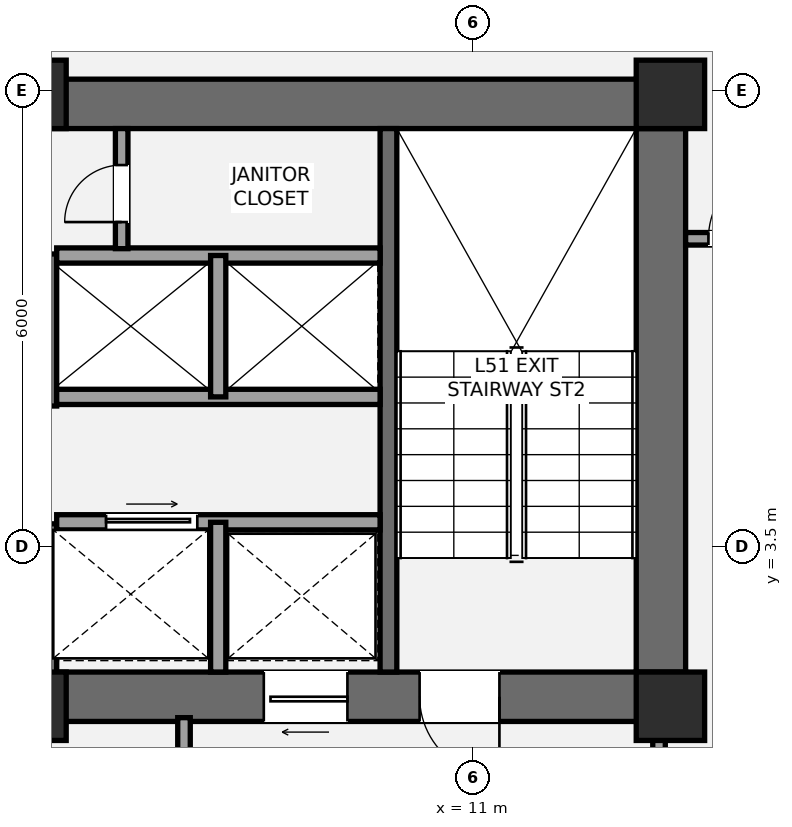
"""IFC4 building model, lengths in metres.
Left out: names, types, materials, properties, quantities, classifications, styles, units other than length and angle.
Written with IfcOpenShell. Run it as: python <this file> out.ifc"""

import sys

from ifc_helpers import new_model, si_unit, direction, frame, frame_2d, origin, origin_2d, place, context, subcontext, project, spatial, rectangle, extrude, element, fill, save


model = new_model("IFC4")
c1 = context("Model", 3, precision=1e-05, world=origin(), true_north=direction((0.0, 1.0)))
c2 = subcontext(c1, "Body", "Model", "MODEL_VIEW")
j1 = project(units=[si_unit("LENGTHUNIT", "METRE"), si_unit("PLANEANGLEUNIT", "RADIAN")], contexts=[c1])
p1 = place(None, origin())
s1 = spatial("IfcSite", under=j1, at=p1, CompositionType="ELEMENT")
p2 = place(p1, origin())
s2 = spatial("IfcBuilding", under=s1, at=p2, CompositionType="ELEMENT")
p3 = place(p2, frame((0.0, 0.0, 185.4)))
s3 = spatial("IfcBuildingStorey", under=s2, at=p3, CompositionType="ELEMENT", Elevation=185.4)
p4 = place(p3, frame((13.475, 1.2, 0.0), z_axis=(0.0, 0.0, 1.0), x_axis=(0.0, 1.0, 0.0)))
e1 = element("IfcWall", 1, at=p4, inside=s3, PredefinedType="SHEAR", context=c2, shape_type="SweptSolid", body=[
    extrude(rectangle(XDim=8.45, YDim=0.65, at=frame_2d((4.225, 0.0))), origin(), (0.0, 0.0, 1.0), 3.2),
])
p5 = place(p3, frame((4.475, 9.325, 0.0), z_axis=(0.0, 0.0, 1.0), x_axis=(1.0, 0.0, 0.0)))
e2 = element("IfcWall", 2, at=p5, inside=s3, PredefinedType="SHEAR", context=c2, shape_type="SweptSolid", body=[
    extrude(rectangle(XDim=9.325, YDim=0.65, at=frame_2d((4.663, 0.0))), origin(), (0.0, 0.0, 1.0), 3.2),
])
p6 = place(p3, frame((13.8, 1.525, 0.0), z_axis=(0.0, 0.0, 1.0), x_axis=(-1.0, 0.0, 0.0)))
e3 = element("IfcWall", 3, at=p6, inside=s3, PredefinedType="SHEAR", context=c2, shape_type="SweptSolid", body=[
    extrude(rectangle(XDim=8.925, YDim=0.65, at=frame_2d((4.462, 0.0))), origin(), (0.0, 0.0, 1.0), 3.2),
])
p7 = place(p6, frame((2.45, 0.0, 0.0)))
e4 = element("IfcOpeningElement", 4, at=p7, cuts=e3, PredefinedType="OPENING", context=c2, shape_type="SweptSolid", body=[
    extrude(rectangle(XDim=1.05, YDim=2.15, at=frame_2d((0.525, 1.075))), frame((0.0, 0.335, 0.0), z_axis=(0.0, -1.0, 0.0), x_axis=(1.0, 0.0, 0.0)), (0.0, 0.0, 1.0), 0.67),
])
p8 = place(p6, frame((4.45, 0.0, 0.0)))
e5 = element("IfcOpeningElement", 5, at=p8, cuts=e3, PredefinedType="OPENING", context=c2, shape_type="SweptSolid", body=[
    extrude(rectangle(XDim=1.1, YDim=2.2, at=frame_2d((0.55, 1.1))), frame((0.0, 0.335, 0.0), z_axis=(0.0, -1.0, 0.0), x_axis=(1.0, 0.0, 0.0)), (0.0, 0.0, 1.0), 0.67),
])
p9 = place(p3, frame((5.2, 1.2, 0.0), z_axis=(0.0, 0.0, 1.0), x_axis=(0.0, 1.0, 0.0)))
e6 = element("IfcWall", 6, at=p9, inside=s3, PredefinedType="SHEAR", context=c2, shape_type="SweptSolid", body=[
    extrude(rectangle(XDim=2.6, YDim=0.65, at=frame_2d((1.3, 0.0))), origin(), (0.0, 0.0, 1.0), 3.2),
])
p10 = place(p3, frame((5.2, 5.35, 0.0), z_axis=(0.0, 0.0, 1.0), x_axis=(0.0, 1.0, 0.0)))
e7 = element("IfcWall", 7, at=p10, inside=s3, PredefinedType="SHEAR", context=c2, shape_type="SweptSolid", body=[
    extrude(rectangle(XDim=2.0, YDim=0.65, at=frame_2d((1.0, 0.0))), origin(), (0.0, 0.0, 1.0), 3.2),
])
p11 = place(p3, frame((9.89, 1.85, 0.0), z_axis=(0.0, 0.0, 1.0), x_axis=(0.0, 1.0, 0.0)))
e8 = element("IfcWall", 8, at=p11, inside=s3, PredefinedType="SHEAR", context=c2, shape_type="SweptSolid", body=[
    extrude(rectangle(XDim=7.15, YDim=0.22, at=frame_2d((3.575, 0.0))), origin(), (0.0, 0.0, 1.0), 3.2),
])
for number, where, z_axis, x_axis in (
    (9, (5.2, 1.4, 0.0), (0.0, 0.0, 1.0), (1.0, 0.0, 0.0)),
    (10, (5.2, 9.45, 0.0), (0.0, 0.0, 1.0), (1.0, 0.0, 0.0)),
    (11, (13.6, 1.4, 0.0), (0.0, 0.0, 1.0), (1.0, 0.0, 0.0)),
    (12, (13.6, 9.45, 0.0), (0.0, 0.0, 1.0), (1.0, 0.0, 0.0)),
):
    element("IfcColumn", number, at=place(p3, frame(where, z_axis=z_axis, x_axis=x_axis)), inside=s3, PredefinedType="COLUMN", context=c2, shape_type="SweptSolid", body=[
        extrude(rectangle(XDim=0.9, YDim=0.9, at=origin_2d()), origin(), (0.0, 0.0, 1.0), 3.2),
    ])
p12 = place(p3, frame((7.2, -2.15, 0.0), z_axis=(0.0, 0.0, 1.0), x_axis=(0.0, 1.0, 0.0)))
e13 = element("IfcWall", 13, at=p12, inside=s3, PredefinedType="PARTITIONING", context=c2, shape_type="SweptSolid", body=[
    extrude(rectangle(XDim=3.4, YDim=0.165, at=frame_2d((1.7, 0.0))), origin(), (0.0, 0.0, 1.0), 2.473),
])
p13 = place(p3, frame((13.45, -2.15, 0.0), z_axis=(0.0, 0.0, 1.0), x_axis=(0.0, 1.0, 0.0)))
e14 = element("IfcWall", 14, at=p13, inside=s3, PredefinedType="PARTITIONING", context=c2, shape_type="SweptSolid", body=[
    extrude(rectangle(XDim=3.4, YDim=0.165, at=frame_2d((1.7, 0.0))), origin(), (0.0, 0.0, 1.0), 2.473),
])
p14 = place(p13, frame((1.15, 0.0, 0.0)))
e15 = element("IfcOpeningElement", 15, at=p14, cuts=e14, PredefinedType="OPENING", context=c2, shape_type="SweptSolid", body=[
    extrude(rectangle(XDim=1.05, YDim=2.15, at=frame_2d((0.525, 1.075))), frame((0.0, 0.093, 0.0), z_axis=(0.0, -1.0, 0.0), x_axis=(1.0, 0.0, 0.0)), (0.0, 0.0, 1.0), 0.185),
])
p15 = place(p3, frame((5.525, 3.82, 0.0), z_axis=(0.0, 0.0, 1.0), x_axis=(1.0, 0.0, 0.0)))
e16 = element("IfcWall", 16, at=p15, inside=s3, PredefinedType="SOLIDWALL", context=c2, shape_type="SweptSolid", body=[
    extrude(rectangle(XDim=4.255, YDim=0.2, at=frame_2d((2.127, 0.0))), origin(), (0.0, 0.0, 1.0), 3.02),
])
p16 = place(p15, frame((0.65, 0.0, 0.0)))
e17 = element("IfcOpeningElement", 17, at=p16, cuts=e16, PredefinedType="OPENING", context=c2, shape_type="SweptSolid", body=[
    extrude(rectangle(XDim=1.2, YDim=2.2, at=frame_2d((0.6, 1.1))), frame((0.0, 0.11, 0.0), z_axis=(0.0, -1.0, 0.0), x_axis=(1.0, 0.0, 0.0)), (0.0, 0.0, 1.0), 0.22),
])
p17 = place(p3, frame((7.65, 1.85, 0.0), z_axis=(0.0, 0.0, 1.0), x_axis=(0.0, 1.0, 0.0)))
e18 = element("IfcWall", 18, at=p17, inside=s3, PredefinedType="SOLIDWALL", context=c2, shape_type="SweptSolid", body=[
    extrude(rectangle(XDim=1.97, YDim=0.2, at=frame_2d((0.985, 0.0))), origin(), (0.0, 0.0, 1.0), 3.02),
])
for number, where, z_axis, x_axis in (
    (19, (5.525, 5.47, 0.0), (0.0, 0.0, 1.0), (1.0, 0.0, 0.0)),
    (20, (5.525, 7.33, 0.0), (0.0, 0.0, 1.0), (1.0, 0.0, 0.0)),
):
    element("IfcWall", number, at=place(p3, frame(where, z_axis=z_axis, x_axis=x_axis)), inside=s3, PredefinedType="SOLIDWALL", context=c2, shape_type="SweptSolid", body=[
        extrude(rectangle(XDim=4.255, YDim=0.2, at=frame_2d((2.127, 0.0))), origin(), (0.0, 0.0, 1.0), 3.02),
    ])
p18 = place(p3, frame((7.65, 5.47, 0.0), z_axis=(0.0, 0.0, 1.0), x_axis=(0.0, 1.0, 0.0)))
e21 = element("IfcWall", 21, at=p18, inside=s3, PredefinedType="SOLIDWALL", context=c2, shape_type="SweptSolid", body=[
    extrude(rectangle(XDim=1.86, YDim=0.2, at=frame_2d((0.93, 0.0))), origin(), (0.0, 0.0, 1.0), 3.02),
])
p19 = place(p3, frame((6.38, 7.42, 0.0), z_axis=(0.0, 0.0, 1.0), x_axis=(0.0, 1.0, 0.0)))
e22 = element("IfcWall", 22, at=p19, inside=s3, PredefinedType="PARTITIONING", context=c2, shape_type="SweptSolid", body=[
    extrude(rectangle(XDim=1.58, YDim=0.165, at=frame_2d((0.79, 0.0))), origin(), (0.0, 0.0, 1.0), 3.02),
])
p20 = place(p19, frame((0.35, 0.0, 0.0)))
e23 = element("IfcOpeningElement", 23, at=p20, cuts=e22, PredefinedType="OPENING", context=c2, shape_type="SweptSolid", body=[
    extrude(rectangle(XDim=0.75, YDim=2.1, at=frame_2d((0.375, 1.05))), frame((0.0, 0.093, 0.0), z_axis=(0.0, -1.0, 0.0), x_axis=(1.0, 0.0, 0.0)), (0.0, 0.0, 1.0), 0.185),
])
p21 = place(p3, frame((13.8, 7.55, 0.0), z_axis=(0.0, 0.0, 1.0), x_axis=(1.0, 0.0, 0.0)))
e24 = element("IfcWall", 24, at=p21, inside=s3, PredefinedType="PARTITIONING", context=c2, shape_type="SweptSolid", body=[
    extrude(rectangle(XDim=1.75, YDim=0.165, at=frame_2d((0.875, 0.0))), origin(), (0.0, 0.0, 1.0), 3.02),
])
p22 = place(p21, frame((0.3, 0.0, 0.0)))
e25 = element("IfcOpeningElement", 25, at=p22, cuts=e24, PredefinedType="OPENING", context=c2, shape_type="SweptSolid", body=[
    extrude(rectangle(XDim=1.0, YDim=2.15, at=frame_2d((0.5, 1.075))), frame((0.0, 0.093, 0.0), z_axis=(0.0, -1.0, 0.0), x_axis=(1.0, 0.0, 0.0)), (0.0, 0.0, 1.0), 0.185),
])
p23 = place(p7, origin())
e26 = element("IfcDoor", 26, at=p23, inside=s3, OperationType="SINGLE_SWING_LEFT", PredefinedType="DOOR", context=c2, shape_type="SweptSolid", body=[
    extrude(rectangle(XDim=1.05, YDim=2.15, at=frame_2d((0.525, 1.075))), frame((0.0, 0.025, 0.0), z_axis=(0.0, -1.0, 0.0), x_axis=(1.0, 0.0, 0.0)), (0.0, 0.0, 1.0), 0.05),
])
fill(e4, e26)
p24 = place(p8, origin())
e27 = element("IfcDoor", 27, at=p24, inside=s3, OperationType="SLIDING_TO_LEFT", PredefinedType="DOOR", context=c2, shape_type="SweptSolid", body=[
    extrude(rectangle(XDim=1.1, YDim=2.2, at=frame_2d((0.55, 1.1))), frame((0.0, 0.025, 0.0), z_axis=(0.0, -1.0, 0.0), x_axis=(1.0, 0.0, 0.0)), (0.0, 0.0, 1.0), 0.05),
])
fill(e5, e27)
p25 = place(p16, origin())
e28 = element("IfcDoor", 28, at=p25, inside=s3, OperationType="SLIDING_TO_RIGHT", PredefinedType="DOOR", context=c2, shape_type="SweptSolid", body=[
    extrude(rectangle(XDim=1.2, YDim=2.2, at=frame_2d((0.6, 1.1))), frame((0.0, 0.025, 0.0), z_axis=(0.0, -1.0, 0.0), x_axis=(1.0, 0.0, 0.0)), (0.0, 0.0, 1.0), 0.05),
])
fill(e17, e28)
p26 = place(p20, origin())
e29 = element("IfcDoor", 29, at=p26, inside=s3, OperationType="SINGLE_SWING_LEFT", PredefinedType="DOOR", context=c2, shape_type="SweptSolid", body=[
    extrude(rectangle(XDim=0.75, YDim=2.1, at=frame_2d((0.375, 1.05))), frame((0.0, 0.025, 0.0), z_axis=(0.0, -1.0, 0.0), x_axis=(1.0, 0.0, 0.0)), (0.0, 0.0, 1.0), 0.05),
])
fill(e23, e29)
p27 = place(p22, origin())
e30 = element("IfcDoor", 30, at=p27, inside=s3, OperationType="SINGLE_SWING_RIGHT", PredefinedType="DOOR", context=c2, shape_type="SweptSolid", body=[
    extrude(rectangle(XDim=1.0, YDim=2.15, at=frame_2d((0.5, 1.075))), frame((0.0, 0.025, 0.0), z_axis=(0.0, -1.0, 0.0), x_axis=(1.0, 0.0, 0.0)), (0.0, 0.0, 1.0), 0.05),
])
fill(e25, e30)
save(model, sys.argv[1])
